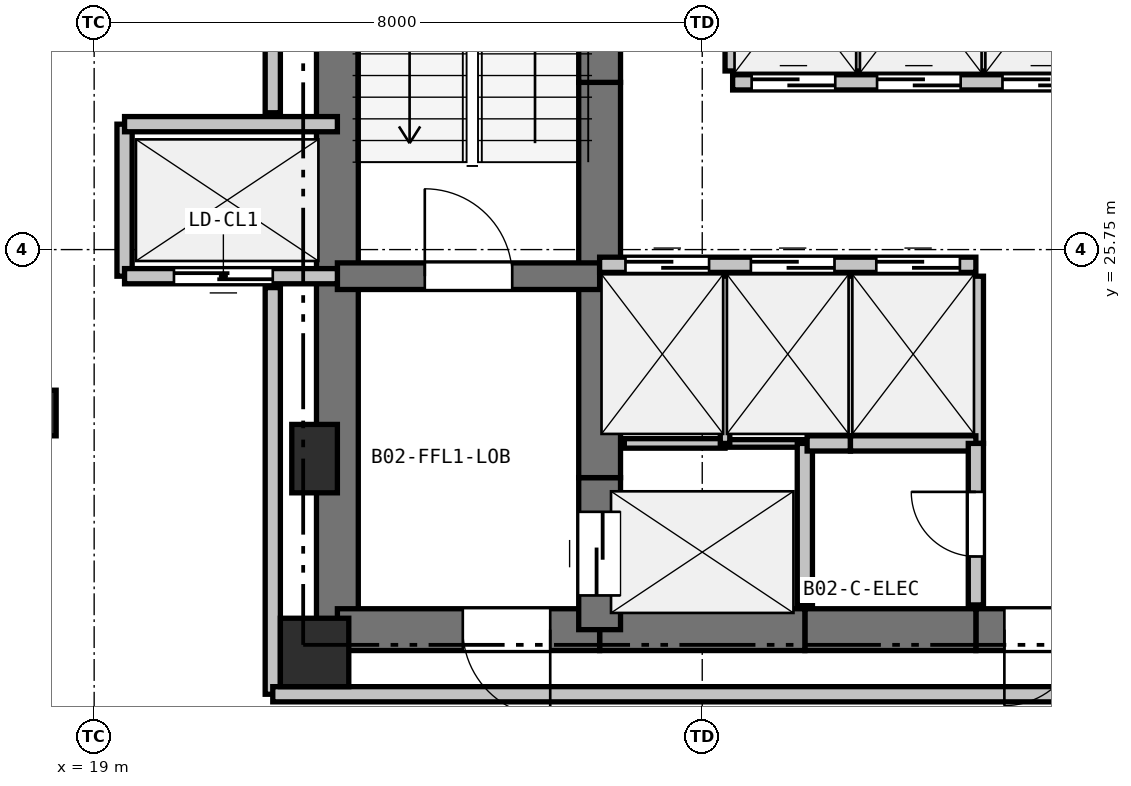
"""IFC4 building model, lengths in metres.
Left out: names, types, materials, properties, quantities, classifications, styles, units other than length and angle.
Written with IfcOpenShell. Run it as: python <this file> out.ifc"""

import sys

from ifc_helpers import new_model, si_unit, direction, frame, frame_2d, origin, origin_2d, place, context, subcontext, project, spatial, rectangle, extrude, element, fill, save


model = new_model("IFC4")
c1 = context("Model", 3, precision=1e-05, world=origin(), true_north=direction((0.0, 1.0)))
c2 = subcontext(c1, "Body", "Model", "MODEL_VIEW")
j1 = project(units=[si_unit("LENGTHUNIT", "METRE"), si_unit("PLANEANGLEUNIT", "RADIAN")], contexts=[c1])
p1 = place(None, origin())
s1 = spatial("IfcSite", under=j1, at=p1, CompositionType="ELEMENT")
p2 = place(p1, origin())
s2 = spatial("IfcBuilding", under=s1, at=p2, CompositionType="ELEMENT")
p3 = place(p2, frame((0.0, 0.0, -9.0)))
s3 = spatial("IfcBuildingStorey", under=s2, at=p3, CompositionType="ELEMENT", Elevation=-9.0)
p4 = place(p3, frame((18.2, 23.6, 0.0), z_axis=(0.0, 0.0, 1.0), x_axis=(1.0, 0.0, 0.0)))
e1 = element("IfcColumn", 1, at=p4, inside=s3, PredefinedType="COLUMN", context=c2, shape_type="SweptSolid", body=[
    extrude(rectangle(XDim=0.6, YDim=0.6, at=origin_2d()), origin(), (0.0, 0.0, 1.0), 4.5),
])
p5 = place(p3, frame((21.9, 20.45, 0.0), z_axis=(0.0, 0.0, 1.0), x_axis=(1.0, 0.0, 0.0)))
e2 = element("IfcColumn", 2, at=p5, inside=s3, PredefinedType="COLUMN", context=c2, shape_type="SweptSolid", body=[
    extrude(rectangle(XDim=0.9, YDim=0.9, at=origin_2d()), origin(), (0.0, 0.0, 1.0), 4.5),
])
p6 = place(p3, frame((21.9, 23.0, 0.0), z_axis=(0.0, 0.0, 1.0), x_axis=(1.0, 0.0, 0.0)))
e3 = element("IfcColumn", 3, at=p6, inside=s3, PredefinedType="PILASTER", context=c2, shape_type="SweptSolid", body=[
    extrude(rectangle(XDim=0.6, YDim=0.9, at=origin_2d()), origin(), (0.0, 0.0, 1.0), 4.5),
])
p7 = place(p3, frame((22.2, 20.75, 0.0), z_axis=(0.0, 0.0, 1.0), x_axis=(0.0, 1.0, 0.0)))
e4 = element("IfcWall", 4, at=p7, inside=s3, PredefinedType="SHEAR", context=c2, shape_type="SweptSolid", body=[
    extrude(rectangle(XDim=4.65, YDim=0.55, at=frame_2d((2.325, 0.0))), origin(), (0.0, 0.0, 1.0), 4.2),
])
p8 = place(p3, frame((22.2, 25.4, 0.0), z_axis=(0.0, 0.0, 1.0), x_axis=(0.0, 1.0, 0.0)))
e5 = element("IfcWall", 5, at=p8, inside=s3, PredefinedType="SHEAR", context=c2, shape_type="SweptSolid", body=[
    extrude(rectangle(XDim=7.35, YDim=0.55, at=frame_2d((3.675, 0.0))), origin(), (0.0, 0.0, 1.0), 4.2),
])
p9 = place(p3, frame((32.35, 20.75, 0.0), z_axis=(0.0, 0.0, 1.0), x_axis=(-1.0, 0.0, 0.0)))
e6 = element("IfcWall", 6, at=p9, inside=s3, PredefinedType="SHEAR", context=c2, shape_type="SweptSolid", body=[
    extrude(rectangle(XDim=1.75, YDim=0.55, at=frame_2d((0.875, 0.0))), origin(), (0.0, 0.0, 1.0), 4.2),
])
p10 = place(p9, frame((0.375, 0.0, 0.0)))
e7 = element("IfcOpeningElement", 7, at=p10, cuts=e6, PredefinedType="OPENING", context=c2, shape_type="SweptSolid", body=[
    extrude(rectangle(XDim=1.0, YDim=2.15, at=frame_2d((0.5, 1.075))), frame((0.0, 0.285, 0.0), z_axis=(0.0, -1.0, 0.0), x_axis=(1.0, 0.0, 0.0)), (0.0, 0.0, 1.0), 0.57),
])
p11 = place(p3, frame((30.6, 20.75, 0.0), z_axis=(0.0, 0.0, 1.0), x_axis=(-1.0, 0.0, 0.0)))
e8 = element("IfcWall", 8, at=p11, inside=s3, PredefinedType="SHEAR", context=c2, shape_type="SweptSolid", body=[
    extrude(rectangle(XDim=2.25, YDim=0.55, at=frame_2d((1.125, 0.0))), origin(), (0.0, 0.0, 1.0), 4.2),
])
p12 = place(p3, frame((28.35, 20.75, 0.0), z_axis=(0.0, 0.0, 1.0), x_axis=(-1.0, 0.0, 0.0)))
e9 = element("IfcWall", 9, at=p12, inside=s3, PredefinedType="SHEAR", context=c2, shape_type="SweptSolid", body=[
    extrude(rectangle(XDim=2.7, YDim=0.55, at=frame_2d((1.35, 0.0))), origin(), (0.0, 0.0, 1.0), 4.2),
])
p13 = place(p3, frame((25.65, 20.75, 0.0), z_axis=(0.0, 0.0, 1.0), x_axis=(-1.0, 0.0, 0.0)))
e10 = element("IfcWall", 10, at=p13, inside=s3, PredefinedType="SHEAR", context=c2, shape_type="SweptSolid", body=[
    extrude(rectangle(XDim=3.45, YDim=0.55, at=frame_2d((1.725, 0.0))), origin(), (0.0, 0.0, 1.0), 4.2),
])
p14 = place(p13, frame((0.65, 0.0, 0.0)))
e11 = element("IfcOpeningElement", 11, at=p14, cuts=e10, PredefinedType="OPENING", context=c2, shape_type="SweptSolid", body=[
    extrude(rectangle(XDim=1.15, YDim=2.15, at=frame_2d((0.575, 1.075))), frame((0.0, 0.285, 0.0), z_axis=(0.0, -1.0, 0.0), x_axis=(1.0, 0.0, 0.0)), (0.0, 0.0, 1.0), 0.57),
])
p15 = place(p3, frame((25.65, 20.75, 0.0), z_axis=(0.0, 0.0, 1.0), x_axis=(0.0, 1.0, 0.0)))
e12 = element("IfcWall", 12, at=p15, inside=s3, PredefinedType="SHEAR", context=c2, shape_type="SweptSolid", body=[
    extrude(rectangle(XDim=2.0, YDim=0.55, at=frame_2d((1.0, 0.0))), origin(), (0.0, 0.0, 1.0), 4.2),
])
p16 = place(p15, frame((0.45, 0.0, 0.0)))
e13 = element("IfcOpeningElement", 13, at=p16, cuts=e12, PredefinedType="OPENING", context=c2, shape_type="SweptSolid", body=[
    extrude(rectangle(XDim=1.1, YDim=2.15, at=frame_2d((0.55, 1.075))), frame((0.0, 0.285, 0.0), z_axis=(0.0, -1.0, 0.0), x_axis=(1.0, 0.0, 0.0)), (0.0, 0.0, 1.0), 0.57),
])
p17 = place(p3, frame((25.65, 22.75, 0.0), z_axis=(0.0, 0.0, 1.0), x_axis=(0.0, 1.0, 0.0)))
e14 = element("IfcWall", 14, at=p17, inside=s3, PredefinedType="SHEAR", context=c2, shape_type="SweptSolid", body=[
    extrude(rectangle(XDim=2.8, YDim=0.55, at=frame_2d((1.4, 0.0))), origin(), (0.0, 0.0, 1.0), 4.2),
])
p18 = place(p3, frame((25.65, 25.55, 0.0), z_axis=(0.0, 0.0, 1.0), x_axis=(0.0, 1.0, 0.0)))
e15 = element("IfcWall", 15, at=p18, inside=s3, PredefinedType="SHEAR", context=c2, shape_type="SweptSolid", body=[
    extrude(rectangle(XDim=2.4, YDim=0.55, at=frame_2d((1.2, 0.0))), origin(), (0.0, 0.0, 1.0), 4.2),
])
p19 = place(p3, frame((25.65, 27.95, 0.0), z_axis=(0.0, 0.0, 1.0), x_axis=(0.0, 1.0, 0.0)))
e16 = element("IfcWall", 16, at=p19, inside=s3, PredefinedType="SHEAR", context=c2, shape_type="SweptSolid", body=[
    extrude(rectangle(XDim=4.8, YDim=0.55, at=frame_2d((2.4, 0.0))), origin(), (0.0, 0.0, 1.0), 4.2),
])
p20 = place(p3, frame((22.2, 25.4, 0.0), z_axis=(0.0, 0.0, 1.0), x_axis=(1.0, 0.0, 0.0)))
e17 = element("IfcWall", 17, at=p20, inside=s3, PredefinedType="SHEAR", context=c2, shape_type="SweptSolid", body=[
    extrude(rectangle(XDim=3.45, YDim=0.35, at=frame_2d((1.725, 0.0))), origin(), (0.0, 0.0, 1.0), 4.2),
])
p21 = place(p20, frame((1.15, 0.0, 0.0)))
e18 = element("IfcOpeningElement", 18, at=p21, cuts=e17, PredefinedType="OPENING", context=c2, shape_type="SweptSolid", body=[
    extrude(rectangle(XDim=1.15, YDim=2.15, at=frame_2d((0.575, 1.075))), frame((0.0, 0.185, 0.0), z_axis=(0.0, -1.0, 0.0), x_axis=(1.0, 0.0, 0.0)), (0.0, 0.0, 1.0), 0.37),
])
p22 = place(p3, frame((25.65, 25.55, 0.0), z_axis=(0.0, 0.0, 1.0), x_axis=(1.0, 0.0, 0.0)))
e19 = element("IfcWall", 19, at=p22, inside=s3, PredefinedType="PARTITIONING", context=c2, shape_type="SweptSolid", body=[
    extrude(rectangle(XDim=4.95, YDim=0.2, at=frame_2d((2.475, 0.0))), origin(), (0.0, 0.0, 1.0), 4.2),
])
p23 = place(p22, frame((0.34, 0.0, 0.0)))
e20 = element("IfcOpeningElement", 20, at=p23, cuts=e19, PredefinedType="OPENING", context=c2, shape_type="SweptSolid", body=[
    extrude(rectangle(XDim=1.1, YDim=2.15, at=frame_2d((0.55, 1.075))), frame((0.0, 0.11, 0.0), z_axis=(0.0, -1.0, 0.0), x_axis=(1.0, 0.0, 0.0)), (0.0, 0.0, 1.0), 0.22),
])
p24 = place(p22, frame((1.99, 0.0, 0.0)))
e21 = element("IfcOpeningElement", 21, at=p24, cuts=e19, PredefinedType="OPENING", context=c2, shape_type="SweptSolid", body=[
    extrude(rectangle(XDim=1.1, YDim=2.15, at=frame_2d((0.55, 1.075))), frame((0.0, 0.11, 0.0), z_axis=(0.0, -1.0, 0.0), x_axis=(1.0, 0.0, 0.0)), (0.0, 0.0, 1.0), 0.22),
])
p25 = place(p22, frame((3.64, 0.0, 0.0)))
e22 = element("IfcOpeningElement", 22, at=p25, cuts=e19, PredefinedType="OPENING", context=c2, shape_type="SweptSolid", body=[
    extrude(rectangle(XDim=1.1, YDim=2.15, at=frame_2d((0.55, 1.075))), frame((0.0, 0.11, 0.0), z_axis=(0.0, -1.0, 0.0), x_axis=(1.0, 0.0, 0.0)), (0.0, 0.0, 1.0), 0.22),
])
p26 = place(p3, frame((27.4, 27.95, 0.0), z_axis=(0.0, 0.0, 1.0), x_axis=(1.0, 0.0, 0.0)))
e23 = element("IfcWall", 23, at=p26, inside=s3, PredefinedType="PARTITIONING", context=c2, shape_type="SweptSolid", body=[
    extrude(rectangle(XDim=4.95, YDim=0.2, at=frame_2d((2.475, 0.0))), origin(), (0.0, 0.0, 1.0), 4.2),
])
p27 = place(p26, frame((0.25, 0.0, 0.0)))
e24 = element("IfcOpeningElement", 24, at=p27, cuts=e23, PredefinedType="OPENING", context=c2, shape_type="SweptSolid", body=[
    extrude(rectangle(XDim=1.1, YDim=2.15, at=frame_2d((0.55, 1.075))), frame((0.0, 0.11, 0.0), z_axis=(0.0, -1.0, 0.0), x_axis=(1.0, 0.0, 0.0)), (0.0, 0.0, 1.0), 0.22),
])
p28 = place(p26, frame((1.9, 0.0, 0.0)))
e25 = element("IfcOpeningElement", 25, at=p28, cuts=e23, PredefinedType="OPENING", context=c2, shape_type="SweptSolid", body=[
    extrude(rectangle(XDim=1.1, YDim=2.15, at=frame_2d((0.55, 1.075))), frame((0.0, 0.11, 0.0), z_axis=(0.0, -1.0, 0.0), x_axis=(1.0, 0.0, 0.0)), (0.0, 0.0, 1.0), 0.22),
])
p29 = place(p26, frame((3.55, 0.0, 0.0)))
e26 = element("IfcOpeningElement", 26, at=p29, cuts=e23, PredefinedType="OPENING", context=c2, shape_type="SweptSolid", body=[
    extrude(rectangle(XDim=1.1, YDim=2.15, at=frame_2d((0.55, 1.075))), frame((0.0, 0.11, 0.0), z_axis=(0.0, -1.0, 0.0), x_axis=(1.0, 0.0, 0.0)), (0.0, 0.0, 1.0), 0.22),
])
p30 = place(p3, frame((19.4, 25.4, 0.0), z_axis=(0.0, 0.0, 1.0), x_axis=(0.0, 1.0, 0.0)))
e27 = element("IfcWall", 27, at=p30, inside=s3, PredefinedType="PARTITIONING", context=c2, shape_type="SweptSolid", body=[
    extrude(rectangle(XDim=2.0, YDim=0.2, at=frame_2d((1.0, 0.0))), origin(), (0.0, 0.0, 1.0), 4.2),
])
p31 = place(p3, frame((19.4, 27.4, 0.0), z_axis=(0.0, 0.0, 1.0), x_axis=(1.0, 0.0, 0.0)))
e28 = element("IfcWall", 28, at=p31, inside=s3, PredefinedType="PARTITIONING", context=c2, shape_type="SweptSolid", body=[
    extrude(rectangle(XDim=2.8, YDim=0.2, at=frame_2d((1.4, 0.0))), origin(), (0.0, 0.0, 1.0), 4.2),
])
p32 = place(p3, frame((22.2, 25.4, 0.0), z_axis=(0.0, 0.0, 1.0), x_axis=(-1.0, 0.0, 0.0)))
e29 = element("IfcWall", 29, at=p32, inside=s3, PredefinedType="PARTITIONING", context=c2, shape_type="SweptSolid", body=[
    extrude(rectangle(XDim=2.8, YDim=0.2, at=frame_2d((1.4, 0.0))), origin(), (0.0, 0.0, 1.0), 4.2),
])
p33 = place(p32, frame((0.85, 0.0, 0.0)))
e30 = element("IfcOpeningElement", 30, at=p33, cuts=e29, PredefinedType="OPENING", context=c2, shape_type="SweptSolid", body=[
    extrude(rectangle(XDim=1.3, YDim=2.2, at=frame_2d((0.65, 1.1))), frame((0.0, 0.11, 0.0), z_axis=(0.0, -1.0, 0.0), x_axis=(1.0, 0.0, 0.0)), (0.0, 0.0, 1.0), 0.22),
])
p34 = place(p3, frame((25.975, 23.2, 0.0), z_axis=(0.0, 0.0, 1.0), x_axis=(1.0, 0.0, 0.0)))
e31 = element("IfcWall", 31, at=p34, inside=s3, PredefinedType="PARTITIONING", context=c2, shape_type="SweptSolid", body=[
    extrude(rectangle(XDim=1.325, YDim=0.125, at=frame_2d((0.663, 0.0))), origin(), (0.0, 0.0, 1.0), 4.2),
])
p35 = place(p3, frame((27.3, 23.2, 0.0), z_axis=(0.0, 0.0, 1.0), x_axis=(1.0, 0.0, 0.0)))
e32 = element("IfcWall", 32, at=p35, inside=s3, PredefinedType="PARTITIONING", context=c2, shape_type="SweptSolid", body=[
    extrude(rectangle(XDim=1.05, YDim=0.1, at=frame_2d((0.525, 0.0))), origin(), (0.0, 0.0, 1.0), 4.2),
])
p36 = place(p3, frame((28.35, 23.2, 0.0), z_axis=(0.0, 0.0, 1.0), x_axis=(0.0, -1.0, 0.0)))
e33 = element("IfcWall", 33, at=p36, inside=s3, PredefinedType="PARTITIONING", context=c2, shape_type="SweptSolid", body=[
    extrude(rectangle(XDim=2.125, YDim=0.2, at=frame_2d((1.062, 0.0))), origin(), (0.0, 0.0, 1.0), 4.2),
])
p37 = place(p3, frame((27.3, 25.4, 0.0), z_axis=(0.0, 0.0, 1.0), x_axis=(0.0, -1.0, 0.0)))
e34 = element("IfcWall", 34, at=p37, inside=s3, PredefinedType="PARTITIONING", context=c2, shape_type="SweptSolid", body=[
    extrude(rectangle(XDim=2.2, YDim=0.125, at=frame_2d((1.1, 0.0))), origin(), (0.0, 0.0, 1.0), 4.2),
])
p38 = place(p3, frame((28.95, 25.4, 0.0), z_axis=(0.0, 0.0, 1.0), x_axis=(0.0, -1.0, 0.0)))
e35 = element("IfcWall", 35, at=p38, inside=s3, PredefinedType="PARTITIONING", context=c2, shape_type="SweptSolid", body=[
    extrude(rectangle(XDim=2.2, YDim=0.1, at=frame_2d((1.1, 0.0))), origin(), (0.0, 0.0, 1.0), 4.2),
])
p39 = place(p3, frame((28.95, 23.2, 0.0), z_axis=(0.0, 0.0, 1.0), x_axis=(-1.0, 0.0, 0.0)))
e36 = element("IfcWall", 36, at=p39, inside=s3, PredefinedType="PARTITIONING", context=c2, shape_type="SweptSolid", body=[
    extrude(rectangle(XDim=0.57, YDim=0.2, at=frame_2d((0.285, 0.0))), origin(), (0.0, 0.0, 1.0), 4.2),
])
p40 = place(p3, frame((30.6, 25.4, 0.0), z_axis=(0.0, 0.0, 1.0), x_axis=(0.0, -1.0, 0.0)))
e37 = element("IfcWall", 37, at=p40, inside=s3, PredefinedType="PARTITIONING", context=c2, shape_type="SweptSolid", body=[
    extrude(rectangle(XDim=2.2, YDim=0.2, at=frame_2d((1.1, 0.0))), origin(), (0.0, 0.0, 1.0), 4.2),
])
p41 = place(p3, frame((30.6, 23.2, 0.0), z_axis=(0.0, 0.0, 1.0), x_axis=(-1.0, 0.0, 0.0)))
e38 = element("IfcWall", 38, at=p41, inside=s3, PredefinedType="PARTITIONING", context=c2, shape_type="SweptSolid", body=[
    extrude(rectangle(XDim=1.65, YDim=0.2, at=frame_2d((0.825, 0.0))), origin(), (0.0, 0.0, 1.0), 4.2),
])
p42 = place(p3, frame((29.05, 30.3, 0.0), z_axis=(0.0, 0.0, 1.0), x_axis=(0.0, -1.0, 0.0)))
e39 = element("IfcWall", 39, at=p42, inside=s3, PredefinedType="PARTITIONING", context=c2, shape_type="SweptSolid", body=[
    extrude(rectangle(XDim=2.2, YDim=0.125, at=frame_2d((1.1, 0.0))), origin(), (0.0, 0.0, 1.0), 4.2),
])
p43 = place(p3, frame((27.4, 28.1, 0.0), z_axis=(0.0, 0.0, 1.0), x_axis=(0.0, 1.0, 0.0)))
e40 = element("IfcWall", 40, at=p43, inside=s3, PredefinedType="PARTITIONING", context=c2, shape_type="SweptSolid", body=[
    extrude(rectangle(XDim=2.2, YDim=0.2, at=frame_2d((1.1, 0.0))), origin(), (0.0, 0.0, 1.0), 4.2),
])
p44 = place(p3, frame((30.7, 30.3, 0.0), z_axis=(0.0, 0.0, 1.0), x_axis=(0.0, -1.0, 0.0)))
e41 = element("IfcWall", 41, at=p44, inside=s3, PredefinedType="PARTITIONING", context=c2, shape_type="SweptSolid", body=[
    extrude(rectangle(XDim=2.2, YDim=0.1, at=frame_2d((1.1, 0.0))), origin(), (0.0, 0.0, 1.0), 4.2),
])
p45 = place(p3, frame((30.6, 21.075, 0.0), z_axis=(0.0, 0.0, 1.0), x_axis=(0.0, 1.0, 0.0)))
e42 = element("IfcWall", 42, at=p45, inside=s3, PredefinedType="PARTITIONING", context=c2, shape_type="SweptSolid", body=[
    extrude(rectangle(XDim=2.125, YDim=0.2, at=frame_2d((1.062, 0.0))), origin(), (0.0, 0.0, 1.0), 4.2),
])
p46 = place(p45, frame((0.637, 0.0, 0.0)))
e43 = element("IfcOpeningElement", 43, at=p46, cuts=e42, PredefinedType="OPENING", context=c2, shape_type="SweptSolid", body=[
    extrude(rectangle(XDim=0.85, YDim=2.1, at=frame_2d((0.425, 1.05))), frame((0.0, 0.11, 0.0), z_axis=(0.0, -1.0, 0.0), x_axis=(1.0, 0.0, 0.0)), (0.0, 0.0, 1.0), 0.22),
])
p47 = place(p3, frame((21.35, 33.6, 0.0), z_axis=(0.0, 0.0, 1.0), x_axis=(0.0, -1.0, 0.0)))
e44 = element("IfcWall", 44, at=p47, inside=s3, PredefinedType="PARTITIONING", context=c2, shape_type="SweptSolid", body=[
    extrude(rectangle(XDim=6.05, YDim=0.2, at=frame_2d((3.025, 0.0))), origin(), (0.0, 0.0, 1.0), 4.2),
])
p48 = place(p3, frame((21.35, 25.25, 0.0), z_axis=(0.0, 0.0, 1.0), x_axis=(0.0, -1.0, 0.0)))
e45 = element("IfcWall", 45, at=p48, inside=s3, PredefinedType="PARTITIONING", context=c2, shape_type="SweptSolid", body=[
    extrude(rectangle(XDim=5.35, YDim=0.2, at=frame_2d((2.675, 0.0))), origin(), (0.0, 0.0, 1.0), 4.2),
])
p49 = place(p3, frame((21.35, 19.9, 0.0), z_axis=(0.0, 0.0, 1.0), x_axis=(1.0, 0.0, 0.0)))
e46 = element("IfcWall", 46, at=p49, inside=s3, PredefinedType="PARTITIONING", context=c2, shape_type="SweptSolid", body=[
    extrude(rectangle(XDim=15.3, YDim=0.2, at=frame_2d((7.65, 0.0))), origin(), (0.0, 0.0, 1.0), 4.2),
])
p50 = place(p23, origin())
e47 = element("IfcDoor", 47, at=p50, inside=s3, OperationType="SLIDING_TO_LEFT", PredefinedType="DOOR", context=c2, shape_type="SweptSolid", body=[
    extrude(rectangle(XDim=1.1, YDim=2.15, at=frame_2d((0.55, 1.075))), frame((0.0, 0.025, 0.0), z_axis=(0.0, -1.0, 0.0), x_axis=(1.0, 0.0, 0.0)), (0.0, 0.0, 1.0), 0.05),
])
fill(e20, e47)
p51 = place(p24, origin())
e48 = element("IfcDoor", 48, at=p51, inside=s3, OperationType="SLIDING_TO_LEFT", PredefinedType="DOOR", context=c2, shape_type="SweptSolid", body=[
    extrude(rectangle(XDim=1.1, YDim=2.15, at=frame_2d((0.55, 1.075))), frame((0.0, 0.025, 0.0), z_axis=(0.0, -1.0, 0.0), x_axis=(1.0, 0.0, 0.0)), (0.0, 0.0, 1.0), 0.05),
])
fill(e21, e48)
p52 = place(p25, origin())
e49 = element("IfcDoor", 49, at=p52, inside=s3, OperationType="SLIDING_TO_LEFT", PredefinedType="DOOR", context=c2, shape_type="SweptSolid", body=[
    extrude(rectangle(XDim=1.1, YDim=2.15, at=frame_2d((0.55, 1.075))), frame((0.0, 0.025, 0.0), z_axis=(0.0, -1.0, 0.0), x_axis=(1.0, 0.0, 0.0)), (0.0, 0.0, 1.0), 0.05),
])
fill(e22, e49)
p53 = place(p27, origin())
e50 = element("IfcDoor", 50, at=p53, inside=s3, OperationType="SLIDING_TO_LEFT", PredefinedType="DOOR", context=c2, shape_type="SweptSolid", body=[
    extrude(rectangle(XDim=1.1, YDim=2.15, at=frame_2d((0.55, 1.075))), frame((0.0, 0.025, 0.0), z_axis=(0.0, -1.0, 0.0), x_axis=(1.0, 0.0, 0.0)), (0.0, 0.0, 1.0), 0.05),
])
fill(e24, e50)
p54 = place(p28, origin())
e51 = element("IfcDoor", 51, at=p54, inside=s3, OperationType="SLIDING_TO_LEFT", PredefinedType="DOOR", context=c2, shape_type="SweptSolid", body=[
    extrude(rectangle(XDim=1.1, YDim=2.15, at=frame_2d((0.55, 1.075))), frame((0.0, 0.025, 0.0), z_axis=(0.0, -1.0, 0.0), x_axis=(1.0, 0.0, 0.0)), (0.0, 0.0, 1.0), 0.05),
])
fill(e25, e51)
p55 = place(p29, origin())
e52 = element("IfcDoor", 52, at=p55, inside=s3, OperationType="SLIDING_TO_LEFT", PredefinedType="DOOR", context=c2, shape_type="SweptSolid", body=[
    extrude(rectangle(XDim=1.1, YDim=2.15, at=frame_2d((0.55, 1.075))), frame((0.0, 0.025, 0.0), z_axis=(0.0, -1.0, 0.0), x_axis=(1.0, 0.0, 0.0)), (0.0, 0.0, 1.0), 0.05),
])
fill(e26, e52)
p56 = place(p10, origin())
e53 = element("IfcDoor", 53, at=p56, inside=s3, OperationType="SINGLE_SWING_RIGHT", PredefinedType="DOOR", context=c2, shape_type="SweptSolid", body=[
    extrude(rectangle(XDim=1.0, YDim=2.15, at=frame_2d((0.5, 1.075))), frame((0.0, 0.025, 0.0), z_axis=(0.0, -1.0, 0.0), x_axis=(1.0, 0.0, 0.0)), (0.0, 0.0, 1.0), 0.05),
])
fill(e7, e53)
p57 = place(p16, origin())
e54 = element("IfcDoor", 54, at=p57, inside=s3, OperationType="SLIDING_TO_LEFT", PredefinedType="DOOR", context=c2, shape_type="SweptSolid", body=[
    extrude(rectangle(XDim=1.1, YDim=2.15, at=frame_2d((0.55, 1.075))), frame((0.0, 0.025, 0.0), z_axis=(0.0, -1.0, 0.0), x_axis=(1.0, 0.0, 0.0)), (0.0, 0.0, 1.0), 0.05),
])
fill(e13, e54)
p58 = place(p33, origin())
e55 = element("IfcDoor", 55, at=p58, inside=s3, OperationType="SLIDING_TO_LEFT", PredefinedType="DOOR", context=c2, shape_type="SweptSolid", body=[
    extrude(rectangle(XDim=1.3, YDim=2.2, at=frame_2d((0.65, 1.1))), frame((0.0, 0.025, 0.0), z_axis=(0.0, -1.0, 0.0), x_axis=(1.0, 0.0, 0.0)), (0.0, 0.0, 1.0), 0.05),
])
fill(e30, e55)
p59 = place(p21, origin())
e56 = element("IfcDoor", 56, at=p59, inside=s3, OperationType="SINGLE_SWING_LEFT", PredefinedType="DOOR", context=c2, shape_type="SweptSolid", body=[
    extrude(rectangle(XDim=1.15, YDim=2.15, at=frame_2d((0.575, 1.075))), frame((0.0, 0.025, 0.0), z_axis=(0.0, -1.0, 0.0), x_axis=(1.0, 0.0, 0.0)), (0.0, 0.0, 1.0), 0.05),
])
fill(e18, e56)
p60 = place(p14, origin())
e57 = element("IfcDoor", 57, at=p60, inside=s3, OperationType="SINGLE_SWING_LEFT", PredefinedType="DOOR", context=c2, shape_type="SweptSolid", body=[
    extrude(rectangle(XDim=1.15, YDim=2.15, at=frame_2d((0.575, 1.075))), frame((0.0, 0.025, 0.0), z_axis=(0.0, -1.0, 0.0), x_axis=(1.0, 0.0, 0.0)), (0.0, 0.0, 1.0), 0.05),
])
fill(e11, e57)
p61 = place(p46, origin())
e58 = element("IfcDoor", 58, at=p61, inside=s3, OperationType="SINGLE_SWING_RIGHT", PredefinedType="DOOR", context=c2, shape_type="SweptSolid", body=[
    extrude(rectangle(XDim=0.85, YDim=2.1, at=frame_2d((0.425, 1.05))), frame((0.0, 0.025, 0.0), z_axis=(0.0, -1.0, 0.0), x_axis=(1.0, 0.0, 0.0)), (0.0, 0.0, 1.0), 0.05),
])
fill(e43, e58)
save(model, sys.argv[1])
